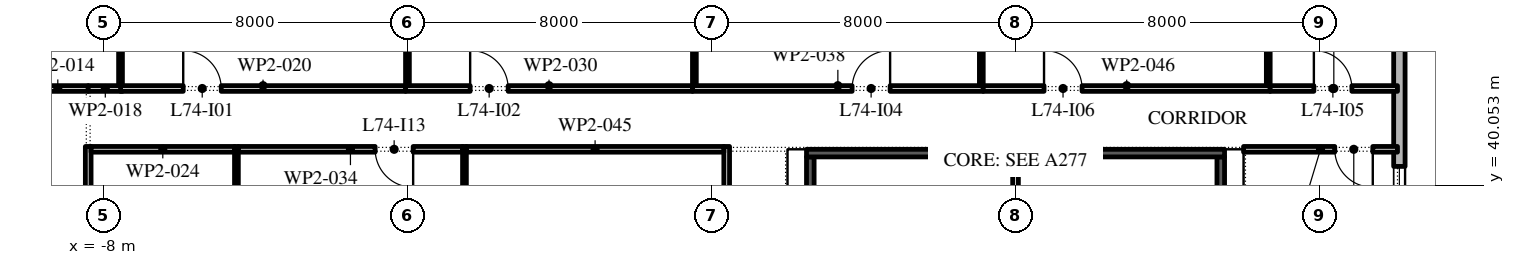
"""IFC4 building model, lengths in metres.
Left out: names, types, materials, properties, quantities, classifications, styles, units other than length and angle.
Written with IfcOpenShell. Run it as: python <this file> out.ifc"""

import sys

from ifc_helpers import new_model, si_unit, direction, frame, frame_2d, origin, place, context, subcontext, project, spatial, rectangle, extrude, element, fill, save


model = new_model("IFC4")
c1 = context("Model", 3, precision=1e-05, world=origin(), true_north=direction((0.0, 1.0)))
c2 = subcontext(c1, "Body", "Model", "MODEL_VIEW")
j1 = project(units=[si_unit("LENGTHUNIT", "METRE"), si_unit("PLANEANGLEUNIT", "RADIAN")], contexts=[c1])
p1 = place(None, origin())
s1 = spatial("IfcSite", under=j1, at=p1, CompositionType="ELEMENT")
p2 = place(p1, origin())
s2 = spatial("IfcBuilding", under=s1, at=p2, CompositionType="ELEMENT")
p3 = place(p2, frame((0.0, 0.0, 338.4)))
s3 = spatial("IfcBuildingStorey", under=s2, at=p3, CompositionType="ELEMENT", Elevation=338.4)
p4 = place(p3, frame((26.1, -2.1, 0.0), z_axis=(0.0, 0.0, 1.0), x_axis=(0.0, 1.0, 0.0)))
e1 = element("IfcWall", 1, at=p4, inside=s3, PredefinedType="STANDARD", context=c2, shape_type="SweptSolid", body=[
    extrude(rectangle(XDim=51.5, YDim=0.3, at=frame_2d((25.75, 0.0))), origin(), (0.0, 0.0, 1.0), 4.0),
])
p5 = place(p4, frame((1.3, 0.0, 0.45)))
e2 = element("IfcOpeningElement", 2, at=p5, cuts=e1, PredefinedType="OPENING", context=c2, shape_type="SweptSolid", body=[
    extrude(rectangle(XDim=4.5, YDim=3.05, at=frame_2d((2.25, 1.525))), frame((0.0, 0.16, 0.0), z_axis=(0.0, -1.0, 0.0), x_axis=(1.0, 0.0, 0.0)), (0.0, 0.0, 1.0), 0.32),
])
p6 = place(p4, frame((8.55, 0.0, 0.45)))
e3 = element("IfcOpeningElement", 3, at=p6, cuts=e1, PredefinedType="OPENING", context=c2, shape_type="SweptSolid", body=[
    extrude(rectangle(XDim=4.5, YDim=3.05, at=frame_2d((2.25, 1.525))), frame((0.0, 0.16, 0.0), z_axis=(0.0, -1.0, 0.0), x_axis=(1.0, 0.0, 0.0)), (0.0, 0.0, 1.0), 0.32),
])
p7 = place(p4, frame((17.0, 0.0, 0.0)))
e4 = element("IfcOpeningElement", 4, at=p7, cuts=e1, PredefinedType="OPENING", context=c2, shape_type="SweptSolid", body=[
    extrude(rectangle(XDim=2.4, YDim=3.5, at=frame_2d((1.2, 1.75))), frame((0.0, 0.16, 0.0), z_axis=(0.0, -1.0, 0.0), x_axis=(1.0, 0.0, 0.0)), (0.0, 0.0, 1.0), 0.32),
])
p8 = place(p4, frame((23.35, 0.0, 0.45)))
e5 = element("IfcOpeningElement", 5, at=p8, cuts=e1, PredefinedType="OPENING", context=c2, shape_type="SweptSolid", body=[
    extrude(rectangle(XDim=4.5, YDim=3.05, at=frame_2d((2.25, 1.525))), frame((0.0, 0.16, 0.0), z_axis=(0.0, -1.0, 0.0), x_axis=(1.0, 0.0, 0.0)), (0.0, 0.0, 1.0), 0.32),
])
p9 = place(p4, frame((30.75, 0.0, 0.45)))
e6 = element("IfcOpeningElement", 6, at=p9, cuts=e1, PredefinedType="OPENING", context=c2, shape_type="SweptSolid", body=[
    extrude(rectangle(XDim=4.5, YDim=3.05, at=frame_2d((2.25, 1.525))), frame((0.0, 0.16, 0.0), z_axis=(0.0, -1.0, 0.0), x_axis=(1.0, 0.0, 0.0)), (0.0, 0.0, 1.0), 0.32),
])
p10 = place(p4, frame((38.15, 0.0, 0.45)))
e7 = element("IfcOpeningElement", 7, at=p10, cuts=e1, PredefinedType="OPENING", context=c2, shape_type="SweptSolid", body=[
    extrude(rectangle(XDim=4.5, YDim=3.05, at=frame_2d((2.25, 1.525))), frame((0.0, 0.16, 0.0), z_axis=(0.0, -1.0, 0.0), x_axis=(1.0, 0.0, 0.0)), (0.0, 0.0, 1.0), 0.32),
])
p11 = place(p4, frame((46.6, 0.0, 0.0)))
e8 = element("IfcOpeningElement", 8, at=p11, cuts=e1, PredefinedType="OPENING", context=c2, shape_type="SweptSolid", body=[
    extrude(rectangle(XDim=2.4, YDim=3.5, at=frame_2d((1.2, 1.75))), frame((0.0, 0.16, 0.0), z_axis=(0.0, -1.0, 0.0), x_axis=(1.0, 0.0, 0.0)), (0.0, 0.0, 1.0), 0.32),
])
p12 = place(p3, frame((21.4, 25.75, 0.0), z_axis=(0.0, 0.0, 1.0), x_axis=(0.0, 1.0, 0.0)))
e9 = element("IfcWall", 9, at=p12, inside=s3, PredefinedType="SHEAR", context=c2, shape_type="SweptSolid", body=[
    extrude(rectangle(XDim=15.05, YDim=0.2, at=frame_2d((7.525, 0.0))), origin(), (0.0, 0.0, 1.0), 4.0),
])
p13 = place(p12, frame((7.075, 0.0, 0.0)))
e10 = element("IfcOpeningElement", 10, at=p13, cuts=e9, PredefinedType="OPENING", context=c2, shape_type="SweptSolid", body=[
    extrude(rectangle(XDim=0.9, YDim=2.1, at=frame_2d((0.45, 1.05))), frame((0.0, 0.11, 0.0), z_axis=(0.0, -1.0, 0.0), x_axis=(1.0, 0.0, 0.0)), (0.0, 0.0, 1.0), 0.22),
])
p14 = place(p3, frame((10.6, 25.75, 0.0), z_axis=(0.0, 0.0, 1.0), x_axis=(0.0, 1.0, 0.0)))
e11 = element("IfcWall", 11, at=p14, inside=s3, PredefinedType="SHEAR", context=c2, shape_type="SweptSolid", body=[
    extrude(rectangle(XDim=15.05, YDim=0.2, at=frame_2d((7.525, 0.0))), origin(), (0.0, 0.0, 1.0), 4.0),
])
p15 = place(p14, frame((7.075, 0.0, 0.0)))
e12 = element("IfcOpeningElement", 12, at=p15, cuts=e11, PredefinedType="OPENING", context=c2, shape_type="SweptSolid", body=[
    extrude(rectangle(XDim=0.9, YDim=2.1, at=frame_2d((0.45, 1.05))), frame((0.0, 0.11, 0.0), z_axis=(0.0, -1.0, 0.0), x_axis=(1.0, 0.0, 0.0)), (0.0, 0.0, 1.0), 0.22),
])
p16 = place(p3, frame((10.5, 40.9, 0.0), z_axis=(0.0, 0.0, 1.0), x_axis=(1.0, 0.0, 0.0)))
e13 = element("IfcWall", 13, at=p16, inside=s3, PredefinedType="SHEAR", context=c2, shape_type="SweptSolid", body=[
    extrude(rectangle(XDim=11.0, YDim=0.2, at=frame_2d((5.5, 0.0))), origin(), (0.0, 0.0, 1.0), 4.0),
])
p17 = place(p3, frame((16.0, 25.75, 0.0), z_axis=(0.0, 0.0, 1.0), x_axis=(0.0, 1.0, 0.0)))
e14 = element("IfcWall", 14, at=p17, inside=s3, PredefinedType="PARTITIONING", context=c2, shape_type="SweptSolid", body=[
    extrude(rectangle(XDim=15.05, YDim=0.15, at=frame_2d((7.525, 0.0))), origin(), (0.0, 0.0, 1.0), 4.0),
])
p18 = place(p3, frame((-10.0, 42.6, 0.0), z_axis=(0.0, 0.0, 1.0), x_axis=(1.0, 0.0, 0.0)))
e15 = element("IfcWall", 15, at=p18, inside=s3, PredefinedType="PARTITIONING", context=c2, shape_type="SweptSolid", body=[
    extrude(rectangle(XDim=1.6, YDim=0.15, at=frame_2d((0.8, 0.0))), origin(), (0.0, 0.0, 1.0), 4.0),
])
p19 = place(p3, frame((-8.4, 41.075, 0.0), z_axis=(0.0, 0.0, 1.0), x_axis=(0.0, -1.0, 0.0)))
e16 = element("IfcWall", 16, at=p19, inside=s3, PredefinedType="PARTITIONING", context=c2, shape_type="SweptSolid", body=[
    extrude(rectangle(XDim=9.025, YDim=0.15, at=frame_2d((4.512, 0.0))), origin(), (0.0, 0.0, 1.0), 4.0),
])
p20 = place(p19, frame((2.175, 0.0, 0.0)))
e17 = element("IfcOpeningElement", 17, at=p20, cuts=e16, PredefinedType="OPENING", context=c2, shape_type="SweptSolid", body=[
    extrude(rectangle(XDim=1.0, YDim=2.1, at=frame_2d((0.5, 1.05))), frame((0.0, 0.085, 0.0), z_axis=(0.0, -1.0, 0.0), x_axis=(1.0, 0.0, 0.0)), (0.0, 0.0, 1.0), 0.17),
])
p21 = place(p3, frame((-8.4, 42.6, 0.0), z_axis=(0.0, 0.0, 1.0), x_axis=(1.0, 0.0, 0.0)))
e18 = element("IfcWall", 18, at=p21, inside=s3, PredefinedType="PARTITIONING", context=c2, shape_type="SweptSolid", body=[
    extrude(rectangle(XDim=0.9, YDim=0.15, at=frame_2d((0.45, 0.0))), origin(), (0.0, 0.0, 1.0), 4.0),
])
p22 = place(p3, frame((-7.55, 42.675, 0.0), z_axis=(0.0, 0.0, 1.0), x_axis=(0.0, 1.0, 0.0)))
e19 = element("IfcWall", 19, at=p22, inside=s3, PredefinedType="PARTITIONING", context=c2, shape_type="SweptSolid", body=[
    extrude(rectangle(XDim=4.775, YDim=0.1, at=frame_2d((2.387, 0.0))), origin(), (0.0, 0.0, 1.0), 3.164),
])
p23 = place(p3, frame((-7.55, 42.6, 0.0), z_axis=(0.0, 0.0, 1.0), x_axis=(1.0, 0.0, 0.0)))
e20 = element("IfcWall", 20, at=p23, inside=s3, PredefinedType="PARTITIONING", context=c2, shape_type="SweptSolid", body=[
    extrude(rectangle(XDim=7.5, YDim=0.15, at=frame_2d((3.75, 0.0))), origin(), (0.0, 0.0, 1.0), 4.0),
])
p24 = place(p23, frame((1.65, 0.0, 0.0)))
e21 = element("IfcOpeningElement", 21, at=p24, cuts=e20, PredefinedType="OPENING", context=c2, shape_type="SweptSolid", body=[
    extrude(rectangle(XDim=1.0, YDim=2.1, at=frame_2d((0.5, 1.05))), frame((0.0, 0.085, 0.0), z_axis=(0.0, -1.0, 0.0), x_axis=(1.0, 0.0, 0.0)), (0.0, 0.0, 1.0), 0.17),
])
p25 = place(p3, frame((-4.5, 32.05, 0.0), z_axis=(0.0, 0.0, 1.0), x_axis=(0.0, 1.0, 0.0)))
e22 = element("IfcWall", 22, at=p25, inside=s3, PredefinedType="PARTITIONING", context=c2, shape_type="SweptSolid", body=[
    extrude(rectangle(XDim=9.025, YDim=0.1, at=frame_2d((4.512, 0.0))), origin(), (0.0, 0.0, 1.0), 4.0),
])
p26 = place(p3, frame((-4.55, 41.0, 0.0), z_axis=(0.0, 0.0, 1.0), x_axis=(-1.0, 0.0, 0.0)))
e23 = element("IfcWall", 23, at=p26, inside=s3, PredefinedType="PARTITIONING", context=c2, shape_type="SweptSolid", body=[
    extrude(rectangle(XDim=3.775, YDim=0.15, at=frame_2d((1.887, 0.0))), origin(), (0.0, 0.0, 1.0), 4.0),
])
p27 = place(p3, frame((-0.05, 42.6, 0.0), z_axis=(0.0, 0.0, 1.0), x_axis=(1.0, 0.0, 0.0)))
e24 = element("IfcWall", 24, at=p27, inside=s3, PredefinedType="PARTITIONING", context=c2, shape_type="SweptSolid", body=[
    extrude(rectangle(XDim=7.55, YDim=0.15, at=frame_2d((3.775, 0.0))), origin(), (0.0, 0.0, 1.0), 4.0),
])
p28 = place(p27, frame((1.7, 0.0, 0.0)))
e25 = element("IfcOpeningElement", 25, at=p28, cuts=e24, PredefinedType="OPENING", context=c2, shape_type="SweptSolid", body=[
    extrude(rectangle(XDim=1.0, YDim=2.1, at=frame_2d((0.5, 1.05))), frame((0.0, 0.085, 0.0), z_axis=(0.0, -1.0, 0.0), x_axis=(1.0, 0.0, 0.0)), (0.0, 0.0, 1.0), 0.17),
])
p29 = place(p3, frame((0.0, 52.8, 0.0), z_axis=(0.0, 0.0, 1.0), x_axis=(0.0, -1.0, 0.0)))
e26 = element("IfcWall", 26, at=p29, inside=s3, PredefinedType="PARTITIONING", context=c2, shape_type="SweptSolid", body=[
    extrude(rectangle(XDim=10.125, YDim=0.1, at=frame_2d((5.062, 0.0))), origin(), (0.0, 0.0, 1.0), 4.0),
])
p30 = place(p3, frame((1.5, 32.05, 0.0), z_axis=(0.0, 0.0, 1.0), x_axis=(0.0, 1.0, 0.0)))
e27 = element("IfcWall", 27, at=p30, inside=s3, PredefinedType="PARTITIONING", context=c2, shape_type="SweptSolid", body=[
    extrude(rectangle(XDim=9.025, YDim=0.1, at=frame_2d((4.512, 0.0))), origin(), (0.0, 0.0, 1.0), 4.0),
])
p31 = place(p3, frame((1.45, 41.0, 0.0), z_axis=(0.0, 0.0, 1.0), x_axis=(-1.0, 0.0, 0.0)))
e28 = element("IfcWall", 28, at=p31, inside=s3, PredefinedType="PARTITIONING", context=c2, shape_type="SweptSolid", body=[
    extrude(rectangle(XDim=5.9, YDim=0.15, at=frame_2d((2.95, 0.0))), origin(), (0.0, 0.0, 1.0), 4.0),
])
p32 = place(p31, frame((1.3, 0.0, 0.0)))
e29 = element("IfcOpeningElement", 29, at=p32, cuts=e28, PredefinedType="OPENING", context=c2, shape_type="SweptSolid", body=[
    extrude(rectangle(XDim=1.0, YDim=2.1, at=frame_2d((0.5, 1.05))), frame((0.0, 0.085, 0.0), z_axis=(0.0, -1.0, 0.0), x_axis=(1.0, 0.0, 0.0)), (0.0, 0.0, 1.0), 0.17),
])
p33 = place(p3, frame((7.5, 42.6, 0.0), z_axis=(0.0, 0.0, 1.0), x_axis=(1.0, 0.0, 0.0)))
e30 = element("IfcWall", 30, at=p33, inside=s3, PredefinedType="PARTITIONING", context=c2, shape_type="SweptSolid", body=[
    extrude(rectangle(XDim=7.65, YDim=0.15, at=frame_2d((3.825, 0.0))), origin(), (0.0, 0.0, 1.0), 4.0),
])
p34 = place(p33, frame((4.2, 0.0, 0.0)))
e31 = element("IfcOpeningElement", 31, at=p34, cuts=e30, PredefinedType="OPENING", context=c2, shape_type="SweptSolid", body=[
    extrude(rectangle(XDim=1.0, YDim=2.1, at=frame_2d((0.5, 1.05))), frame((0.0, 0.085, 0.0), z_axis=(0.0, -1.0, 0.0), x_axis=(1.0, 0.0, 0.0)), (0.0, 0.0, 1.0), 0.17),
])
p35 = place(p3, frame((7.55, 45.95, 0.0), z_axis=(0.0, 0.0, 1.0), x_axis=(0.0, -1.0, 0.0)))
e32 = element("IfcWall", 32, at=p35, inside=s3, PredefinedType="PARTITIONING", context=c2, shape_type="SweptSolid", body=[
    extrude(rectangle(XDim=3.275, YDim=0.1, at=frame_2d((1.637, 0.0))), origin(), (0.0, 0.0, 1.0), 3.164),
])
p36 = place(p3, frame((8.4, 32.0, 0.0), z_axis=(0.0, 0.0, 1.0), x_axis=(0.0, 1.0, 0.0)))
e33 = element("IfcWall", 33, at=p36, inside=s3, PredefinedType="PARTITIONING", context=c2, shape_type="SweptSolid", body=[
    extrude(rectangle(XDim=9.075, YDim=0.15, at=frame_2d((4.538, 0.0))), origin(), (0.0, 0.0, 1.0), 4.0),
])
p37 = place(p36, frame((3.1, 0.0, 0.0)))
e34 = element("IfcOpeningElement", 34, at=p37, cuts=e33, PredefinedType="OPENING", context=c2, shape_type="SweptSolid", body=[
    extrude(rectangle(XDim=1.0, YDim=2.1, at=frame_2d((0.5, 1.05))), frame((0.0, 0.085, 0.0), z_axis=(0.0, -1.0, 0.0), x_axis=(1.0, 0.0, 0.0)), (0.0, 0.0, 1.0), 0.17),
])
p38 = place(p3, frame((8.325, 41.0, 0.0), z_axis=(0.0, 0.0, 1.0), x_axis=(-1.0, 0.0, 0.0)))
e35 = element("IfcWall", 35, at=p38, inside=s3, PredefinedType="PARTITIONING", context=c2, shape_type="SweptSolid", body=[
    extrude(rectangle(XDim=6.775, YDim=0.15, at=frame_2d((3.387, 0.0))), origin(), (0.0, 0.0, 1.0), 4.0),
])
p39 = place(p3, frame((15.15, 42.6, 0.0), z_axis=(0.0, 0.0, 1.0), x_axis=(1.0, 0.0, 0.0)))
e36 = element("IfcWall", 36, at=p39, inside=s3, PredefinedType="PARTITIONING", context=c2, shape_type="SweptSolid", body=[
    extrude(rectangle(XDim=7.55, YDim=0.15, at=frame_2d((3.775, 0.0))), origin(), (0.0, 0.0, 1.0), 4.0),
])
p40 = place(p39, frame((1.6, 0.0, 0.0)))
e37 = element("IfcOpeningElement", 37, at=p40, cuts=e36, PredefinedType="OPENING", context=c2, shape_type="SweptSolid", body=[
    extrude(rectangle(XDim=1.0, YDim=2.1, at=frame_2d((0.5, 1.05))), frame((0.0, 0.085, 0.0), z_axis=(0.0, -1.0, 0.0), x_axis=(1.0, 0.0, 0.0)), (0.0, 0.0, 1.0), 0.17),
])
p41 = place(p3, frame((15.1, 45.95, 0.0), z_axis=(0.0, 0.0, 1.0), x_axis=(0.0, -1.0, 0.0)))
e38 = element("IfcWall", 38, at=p41, inside=s3, PredefinedType="PARTITIONING", context=c2, shape_type="SweptSolid", body=[
    extrude(rectangle(XDim=3.275, YDim=0.1, at=frame_2d((1.637, 0.0))), origin(), (0.0, 0.0, 1.0), 4.0),
])
p42 = place(p3, frame((22.65, 42.675, 0.0), z_axis=(0.0, 0.0, 1.0), x_axis=(0.0, 1.0, 0.0)))
e39 = element("IfcWall", 39, at=p42, inside=s3, PredefinedType="PARTITIONING", context=c2, shape_type="SweptSolid", body=[
    extrude(rectangle(XDim=6.735, YDim=0.1, at=frame_2d((3.367, 0.0))), origin(), (0.0, 0.0, 1.0), 4.0),
])
p43 = place(p3, frame((22.7, 42.6, 0.0), z_axis=(0.0, 0.0, 1.0), x_axis=(1.0, 0.0, 0.0)))
e40 = element("IfcWall", 40, at=p43, inside=s3, PredefinedType="PARTITIONING", context=c2, shape_type="SweptSolid", body=[
    extrude(rectangle(XDim=3.35, YDim=0.15, at=frame_2d((1.675, 0.0))), origin(), (0.0, 0.0, 1.0), 4.0),
])
p44 = place(p43, frame((1.15, 0.0, 0.0)))
e41 = element("IfcOpeningElement", 41, at=p44, cuts=e40, PredefinedType="OPENING", context=c2, shape_type="SweptSolid", body=[
    extrude(rectangle(XDim=1.0, YDim=2.1, at=frame_2d((0.5, 1.05))), frame((0.0, 0.085, 0.0), z_axis=(0.0, -1.0, 0.0), x_axis=(1.0, 0.0, 0.0)), (0.0, 0.0, 1.0), 0.17),
])
p45 = place(p3, frame((26.05, 41.0, 0.0), z_axis=(0.0, 0.0, 1.0), x_axis=(-1.0, 0.0, 0.0)))
e42 = element("IfcWall", 42, at=p45, inside=s3, PredefinedType="PARTITIONING", context=c2, shape_type="SweptSolid", body=[
    extrude(rectangle(XDim=4.05, YDim=0.15, at=frame_2d((2.025, 0.0))), origin(), (0.0, 0.0, 1.0), 4.0),
])
p46 = place(p45, frame((0.65, 0.0, 0.0)))
e43 = element("IfcOpeningElement", 43, at=p46, cuts=e42, PredefinedType="OPENING", context=c2, shape_type="SweptSolid", body=[
    extrude(rectangle(XDim=1.0, YDim=2.1, at=frame_2d((0.5, 1.05))), frame((0.0, 0.085, 0.0), z_axis=(0.0, -1.0, 0.0), x_axis=(1.0, 0.0, 0.0)), (0.0, 0.0, 1.0), 0.17),
])
p47 = place(p10, origin())
e44 = element("IfcWindow", 44, at=p47, inside=s3, PartitioningType="DOUBLE_PANEL_VERTICAL", PredefinedType="WINDOW", context=c2, shape_type="SweptSolid", body=[
    extrude(rectangle(XDim=4.5, YDim=3.05, at=frame_2d((2.25, 1.525))), frame((0.0, 0.03, 0.0), z_axis=(0.0, -1.0, 0.0), x_axis=(1.0, 0.0, 0.0)), (0.0, 0.0, 1.0), 0.06),
])
fill(e7, e44)
p48 = place(p24, origin())
e45 = element("IfcDoor", 45, at=p48, inside=s3, OperationType="SINGLE_SWING_RIGHT", PredefinedType="DOOR", context=c2, shape_type="SweptSolid", body=[
    extrude(rectangle(XDim=1.0, YDim=2.1, at=frame_2d((0.5, 1.05))), frame((0.0, 0.025, 0.0), z_axis=(0.0, -1.0, 0.0), x_axis=(1.0, 0.0, 0.0)), (0.0, 0.0, 1.0), 0.05),
])
fill(e21, e45)
p49 = place(p28, origin())
e46 = element("IfcDoor", 46, at=p49, inside=s3, OperationType="SINGLE_SWING_RIGHT", PredefinedType="DOOR", context=c2, shape_type="SweptSolid", body=[
    extrude(rectangle(XDim=1.0, YDim=2.1, at=frame_2d((0.5, 1.05))), frame((0.0, 0.025, 0.0), z_axis=(0.0, -1.0, 0.0), x_axis=(1.0, 0.0, 0.0)), (0.0, 0.0, 1.0), 0.05),
])
fill(e25, e46)
p50 = place(p34, origin())
e47 = element("IfcDoor", 47, at=p50, inside=s3, OperationType="SINGLE_SWING_LEFT", PredefinedType="DOOR", context=c2, shape_type="SweptSolid", body=[
    extrude(rectangle(XDim=1.0, YDim=2.1, at=frame_2d((0.5, 1.05))), frame((0.0, 0.025, 0.0), z_axis=(0.0, -1.0, 0.0), x_axis=(1.0, 0.0, 0.0)), (0.0, 0.0, 1.0), 0.05),
])
fill(e31, e47)
p51 = place(p44, origin())
e48 = element("IfcDoor", 48, at=p51, inside=s3, OperationType="SINGLE_SWING_RIGHT", PredefinedType="DOOR", context=c2, shape_type="SweptSolid", body=[
    extrude(rectangle(XDim=1.0, YDim=2.1, at=frame_2d((0.5, 1.05))), frame((0.0, 0.025, 0.0), z_axis=(0.0, -1.0, 0.0), x_axis=(1.0, 0.0, 0.0)), (0.0, 0.0, 1.0), 0.05),
])
fill(e41, e48)
p52 = place(p40, origin())
e49 = element("IfcDoor", 49, at=p52, inside=s3, OperationType="SINGLE_SWING_RIGHT", PredefinedType="DOOR", context=c2, shape_type="SweptSolid", body=[
    extrude(rectangle(XDim=1.0, YDim=2.1, at=frame_2d((0.5, 1.05))), frame((0.0, 0.025, 0.0), z_axis=(0.0, -1.0, 0.0), x_axis=(1.0, 0.0, 0.0)), (0.0, 0.0, 1.0), 0.05),
])
fill(e37, e49)
p53 = place(p32, origin())
e50 = element("IfcDoor", 50, at=p53, inside=s3, OperationType="SINGLE_SWING_RIGHT", PredefinedType="DOOR", context=c2, shape_type="SweptSolid", body=[
    extrude(rectangle(XDim=1.0, YDim=2.1, at=frame_2d((0.5, 1.05))), frame((0.0, 0.025, 0.0), z_axis=(0.0, -1.0, 0.0), x_axis=(1.0, 0.0, 0.0)), (0.0, 0.0, 1.0), 0.05),
])
fill(e29, e50)
p54 = place(p46, origin())
e51 = element("IfcDoor", 51, at=p54, inside=s3, OperationType="SINGLE_SWING_RIGHT", PredefinedType="DOOR", context=c2, shape_type="SweptSolid", body=[
    extrude(rectangle(XDim=1.0, YDim=2.1, at=frame_2d((0.5, 1.05))), frame((0.0, 0.025, 0.0), z_axis=(0.0, -1.0, 0.0), x_axis=(1.0, 0.0, 0.0)), (0.0, 0.0, 1.0), 0.05),
])
fill(e43, e51)
save(model, sys.argv[1])
